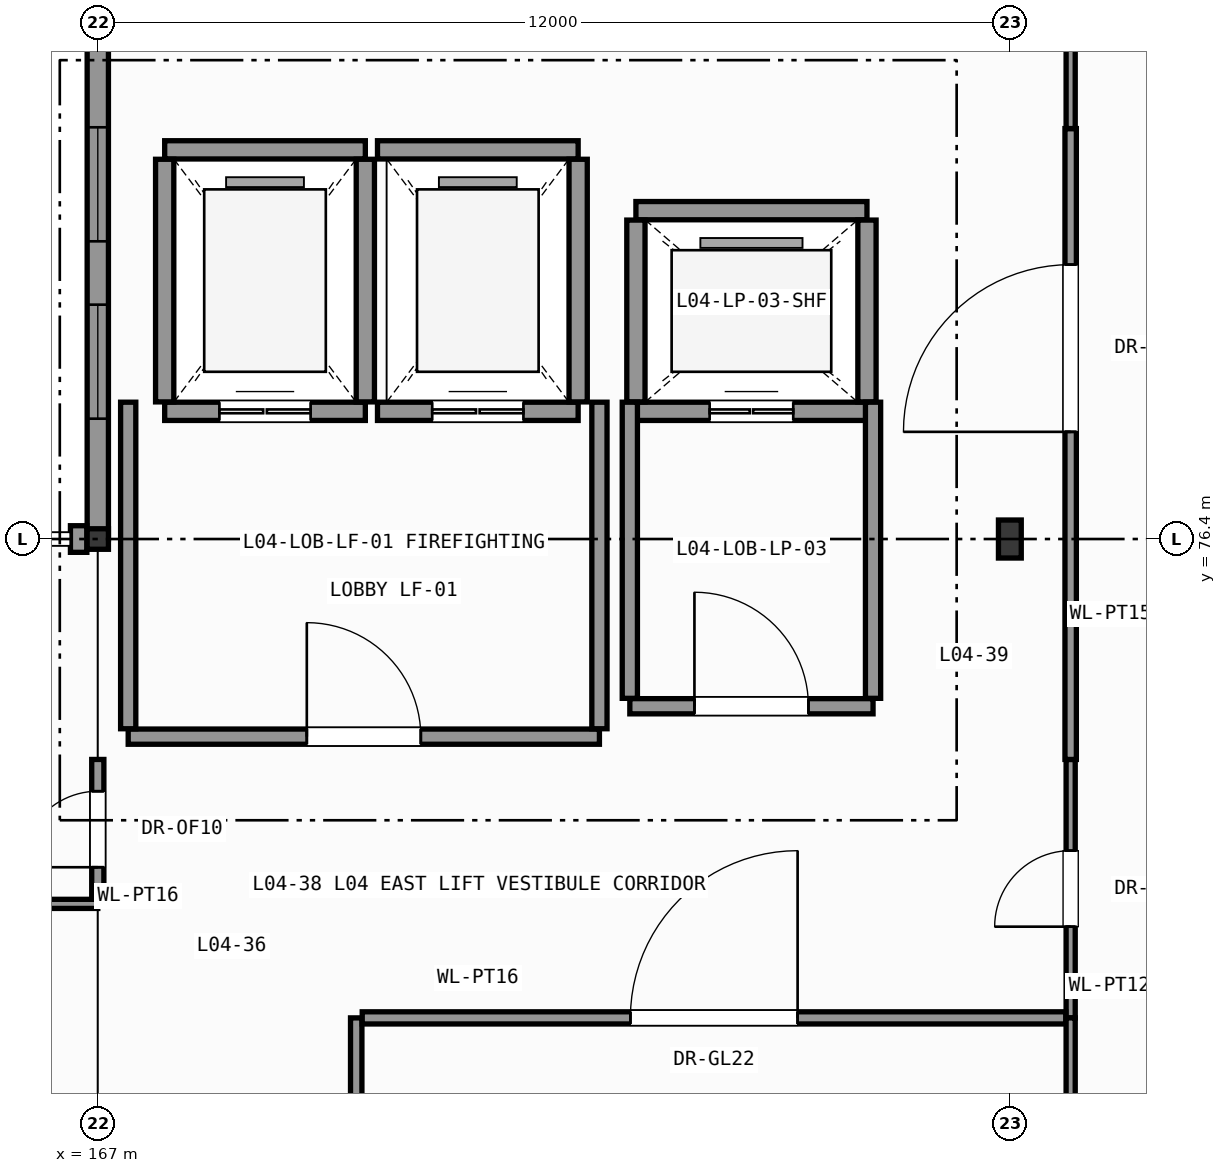
"""IFC4 building model, lengths in metres.
Left out: names, types, materials, properties, quantities, classifications, styles, units other than length and angle.
Written with IfcOpenShell. Run it as: python <this file> out.ifc"""

import sys

from ifc_helpers import new_model, si_unit, direction, frame, frame_2d, origin, origin_2d, place, context, subcontext, project, spatial, rectangle, i_section, extrude, element, fill, save


model = new_model("IFC4")
c1 = context("Model", 3, precision=1e-05, world=origin(), true_north=direction((0.0, 1.0)))
c2 = subcontext(c1, "Body", "Model", "MODEL_VIEW")
j1 = project(units=[si_unit("LENGTHUNIT", "METRE"), si_unit("PLANEANGLEUNIT", "RADIAN")], contexts=[c1])
p1 = place(None, origin())
s1 = spatial("IfcSite", under=j1, at=p1, CompositionType="ELEMENT")
p2 = place(p1, origin())
s2 = spatial("IfcBuilding", under=s1, at=p2, CompositionType="ELEMENT")
p3 = place(p2, frame((0.0, 0.0, 18.0)))
s3 = spatial("IfcBuildingStorey", under=s2, at=p3, CompositionType="ELEMENT", Elevation=18.0)
p4 = place(p3, frame((167.0, 76.4, 0.0), z_axis=(0.0, 0.0, 1.0), x_axis=(1.0, 0.0, 0.0)))
e1 = element("IfcColumn", 1, at=p4, inside=s3, PredefinedType="COLUMN", context=c2, shape_type="SweptSolid", body=[
    extrude(i_section(OverallWidth=0.28, OverallDepth=0.27, WebThickness=0.008, FlangeThickness=0.013, FilletRadius=0.024, at=origin_2d()), origin(), (0.0, 0.0, 1.0), 4.2),
])
p5 = place(p3, frame((179.0, 76.4, 0.0), z_axis=(0.0, 0.0, 1.0), x_axis=(1.0, 0.0, 0.0)))
e2 = element("IfcColumn", 2, at=p5, inside=s3, PredefinedType="COLUMN", context=c2, shape_type="SweptSolid", body=[
    extrude(i_section(OverallWidth=0.3, OverallDepth=0.5, WebThickness=0.014, FlangeThickness=0.028, FilletRadius=0.027, at=origin_2d()), origin(), (0.0, 0.0, 1.0), 4.2),
])
p6 = place(p3, frame((167.0, 76.4, 0.0), z_axis=(0.0, 0.0, 1.0), x_axis=(0.0, 1.0, 0.0)))
e3 = element("IfcWall", 3, at=p6, inside=s3, PredefinedType="SOLIDWALL", context=c2, shape_type="SweptSolid", body=[
    extrude(rectangle(XDim=7.0, YDim=0.28, at=frame_2d((3.5, 0.0))), origin(), (0.0, 0.0, 1.0), 3.645),
])
p7 = place(p6, frame((1.583, 0.0, 0.95)))
e4 = element("IfcOpeningElement", 4, at=p7, cuts=e3, PredefinedType="OPENING", context=c2, shape_type="SweptSolid", body=[
    extrude(rectangle(XDim=1.5, YDim=2.29, at=frame_2d((0.75, 1.145))), frame((0.0, 0.15, 0.0), z_axis=(0.0, -1.0, 0.0), x_axis=(1.0, 0.0, 0.0)), (0.0, 0.0, 1.0), 0.3),
])
p8 = place(p6, frame((3.917, 0.0, 0.95)))
e5 = element("IfcOpeningElement", 5, at=p8, cuts=e3, PredefinedType="OPENING", context=c2, shape_type="SweptSolid", body=[
    extrude(rectangle(XDim=1.5, YDim=2.29, at=frame_2d((0.75, 1.145))), frame((0.0, 0.15, 0.0), z_axis=(0.0, -1.0, 0.0), x_axis=(1.0, 0.0, 0.0)), (0.0, 0.0, 1.0), 0.3),
])
p9 = place(p3, frame((166.856, 76.4, 0.0), z_axis=(0.0, 0.0, 1.0), x_axis=(-1.0, 0.0, 0.0)))
e6 = element("IfcWall", 6, at=p9, inside=s3, PredefinedType="SOLIDWALL", context=c2, shape_type="SweptSolid", body=[
    extrude(rectangle(XDim=0.216, YDim=0.35, at=frame_2d((0.108, 0.0))), origin(), (0.0, 0.0, 1.0), 3.98),
])
p10 = place(p3, frame((167.88, 78.08, 0.0), z_axis=(0.0, 0.0, 1.0), x_axis=(1.0, 0.0, 0.0)))
e7 = element("IfcWall", 7, at=p10, inside=s3, PredefinedType="SHEAR", context=c2, shape_type="SweptSolid", body=[
    extrude(rectangle(XDim=2.64, YDim=0.24, at=frame_2d((1.32, 0.0))), origin(), (0.0, 0.0, 1.0), 3.98),
])
p11 = place(p10, frame((0.72, 0.0, 0.0)))
e8 = element("IfcOpeningElement", 8, at=p11, cuts=e7, PredefinedType="OPENING", context=c2, shape_type="SweptSolid", body=[
    extrude(rectangle(XDim=1.2, YDim=2.2, at=frame_2d((0.6, 1.1))), frame((0.0, 0.13, 0.0), z_axis=(0.0, -1.0, 0.0), x_axis=(1.0, 0.0, 0.0)), (0.0, 0.0, 1.0), 0.26),
])
p12 = place(p3, frame((167.88, 81.52, 0.0), z_axis=(0.0, 0.0, 1.0), x_axis=(1.0, 0.0, 0.0)))
e9 = element("IfcWall", 9, at=p12, inside=s3, PredefinedType="SHEAR", context=c2, shape_type="SweptSolid", body=[
    extrude(rectangle(XDim=2.64, YDim=0.24, at=frame_2d((1.32, 0.0))), origin(), (0.0, 0.0, 1.0), 3.98),
])
for number, where, z_axis, x_axis in (
    (10, (167.88, 78.204, 0.0), (0.0, 0.0, 1.0), (0.0, 1.0, 0.0)),
    (11, (170.52, 78.204, 0.0), (0.0, 0.0, 1.0), (0.0, 1.0, 0.0)),
):
    element("IfcWall", number, at=place(p3, frame(where, z_axis=z_axis, x_axis=x_axis)), inside=s3, PredefinedType="SHEAR", context=c2, shape_type="SweptSolid", body=[
        extrude(rectangle(XDim=3.192, YDim=0.24, at=frame_2d((1.596, 0.0))), origin(), (0.0, 0.0, 1.0), 3.98),
    ])
p13 = place(p3, frame((170.68, 78.08, 0.0), z_axis=(0.0, 0.0, 1.0), x_axis=(1.0, 0.0, 0.0)))
e12 = element("IfcWall", 12, at=p13, inside=s3, PredefinedType="SHEAR", context=c2, shape_type="SweptSolid", body=[
    extrude(rectangle(XDim=2.64, YDim=0.24, at=frame_2d((1.32, 0.0))), origin(), (0.0, 0.0, 1.0), 3.98),
])
p14 = place(p13, frame((0.72, 0.0, 0.0)))
e13 = element("IfcOpeningElement", 13, at=p14, cuts=e12, PredefinedType="OPENING", context=c2, shape_type="SweptSolid", body=[
    extrude(rectangle(XDim=1.2, YDim=2.2, at=frame_2d((0.6, 1.1))), frame((0.0, 0.13, 0.0), z_axis=(0.0, -1.0, 0.0), x_axis=(1.0, 0.0, 0.0)), (0.0, 0.0, 1.0), 0.26),
])
p15 = place(p3, frame((170.68, 81.52, 0.0), z_axis=(0.0, 0.0, 1.0), x_axis=(1.0, 0.0, 0.0)))
e14 = element("IfcWall", 14, at=p15, inside=s3, PredefinedType="SHEAR", context=c2, shape_type="SweptSolid", body=[
    extrude(rectangle(XDim=2.64, YDim=0.24, at=frame_2d((1.32, 0.0))), origin(), (0.0, 0.0, 1.0), 3.98),
])
p16 = place(p3, frame((173.32, 78.204, 0.0), z_axis=(0.0, 0.0, 1.0), x_axis=(0.0, 1.0, 0.0)))
e15 = element("IfcWall", 15, at=p16, inside=s3, PredefinedType="SHEAR", context=c2, shape_type="SweptSolid", body=[
    extrude(rectangle(XDim=3.192, YDim=0.24, at=frame_2d((1.596, 0.0))), origin(), (0.0, 0.0, 1.0), 3.98),
])
p17 = place(p3, frame((174.08, 78.08, 0.0), z_axis=(0.0, 0.0, 1.0), x_axis=(1.0, 0.0, 0.0)))
e16 = element("IfcWall", 16, at=p17, inside=s3, PredefinedType="SHEAR", context=c2, shape_type="SweptSolid", body=[
    extrude(rectangle(XDim=3.04, YDim=0.24, at=frame_2d((1.52, 0.0))), origin(), (0.0, 0.0, 1.0), 3.98),
])
p18 = place(p17, frame((0.97, 0.0, 0.0)))
e17 = element("IfcOpeningElement", 17, at=p18, cuts=e16, PredefinedType="OPENING", context=c2, shape_type="SweptSolid", body=[
    extrude(rectangle(XDim=1.1, YDim=2.2, at=frame_2d((0.55, 1.1))), frame((0.0, 0.13, 0.0), z_axis=(0.0, -1.0, 0.0), x_axis=(1.0, 0.0, 0.0)), (0.0, 0.0, 1.0), 0.26),
])
p19 = place(p3, frame((174.08, 80.72, 0.0), z_axis=(0.0, 0.0, 1.0), x_axis=(1.0, 0.0, 0.0)))
e18 = element("IfcWall", 18, at=p19, inside=s3, PredefinedType="SHEAR", context=c2, shape_type="SweptSolid", body=[
    extrude(rectangle(XDim=3.04, YDim=0.24, at=frame_2d((1.52, 0.0))), origin(), (0.0, 0.0, 1.0), 3.98),
])
for number, where, z_axis, x_axis in (
    (19, (174.08, 78.204, 0.0), (0.0, 0.0, 1.0), (0.0, 1.0, 0.0)),
    (20, (177.12, 78.204, 0.0), (0.0, 0.0, 1.0), (0.0, 1.0, 0.0)),
):
    element("IfcWall", number, at=place(p3, frame(where, z_axis=z_axis, x_axis=x_axis)), inside=s3, PredefinedType="SHEAR", context=c2, shape_type="SweptSolid", body=[
        extrude(rectangle(XDim=2.392, YDim=0.24, at=frame_2d((1.196, 0.0))), origin(), (0.0, 0.0, 1.0), 3.98),
    ])
p20 = place(p3, frame((167.4, 73.8, 0.0), z_axis=(0.0, 0.0, 1.0), x_axis=(1.0, 0.0, 0.0)))
e21 = element("IfcWall", 21, at=p20, inside=s3, PredefinedType="PARTITIONING", context=c2, shape_type="SweptSolid", body=[
    extrude(rectangle(XDim=6.2, YDim=0.2, at=frame_2d((3.1, 0.0))), origin(), (0.0, 0.0, 1.0), 3.575),
])
p21 = place(p20, frame((2.35, 0.0, 0.0)))
e22 = element("IfcOpeningElement", 22, at=p21, cuts=e21, PredefinedType="OPENING", context=c2, shape_type="SweptSolid", body=[
    extrude(rectangle(XDim=1.5, YDim=2.2, at=frame_2d((0.75, 1.1))), frame((0.0, 0.11, 0.0), z_axis=(0.0, -1.0, 0.0), x_axis=(1.0, 0.0, 0.0)), (0.0, 0.0, 1.0), 0.22),
])
for number, where, z_axis, x_axis in (
    (23, (167.4, 73.904, 0.0), (0.0, 0.0, 1.0), (0.0, 1.0, 0.0)),
    (24, (173.6, 73.904, 0.0), (0.0, 0.0, 1.0), (0.0, 1.0, 0.0)),
):
    element("IfcWall", number, at=place(p3, frame(where, z_axis=z_axis, x_axis=x_axis)), inside=s3, PredefinedType="PARTITIONING", context=c2, shape_type="SweptSolid", body=[
        extrude(rectangle(XDim=4.296, YDim=0.2, at=frame_2d((2.148, 0.0))), origin(), (0.0, 0.0, 1.0), 3.98),
    ])
p22 = place(p3, frame((174.0, 74.2, 0.0), z_axis=(0.0, 0.0, 1.0), x_axis=(1.0, 0.0, 0.0)))
e25 = element("IfcWall", 25, at=p22, inside=s3, PredefinedType="PARTITIONING", context=c2, shape_type="SweptSolid", body=[
    extrude(rectangle(XDim=3.2, YDim=0.2, at=frame_2d((1.6, 0.0))), origin(), (0.0, 0.0, 1.0), 3.98),
])
p23 = place(p22, frame((0.85, 0.0, 0.0)))
e26 = element("IfcOpeningElement", 26, at=p23, cuts=e25, PredefinedType="OPENING", context=c2, shape_type="SweptSolid", body=[
    extrude(rectangle(XDim=1.5, YDim=2.2, at=frame_2d((0.75, 1.1))), frame((0.0, 0.11, 0.0), z_axis=(0.0, -1.0, 0.0), x_axis=(1.0, 0.0, 0.0)), (0.0, 0.0, 1.0), 0.22),
])
for number, where, z_axis, x_axis in (
    (27, (174.0, 74.304, 0.0), (0.0, 0.0, 1.0), (0.0, 1.0, 0.0)),
    (28, (177.2, 74.304, 0.0), (0.0, 0.0, 1.0), (0.0, 1.0, 0.0)),
):
    element("IfcWall", number, at=place(p3, frame(where, z_axis=z_axis, x_axis=x_axis)), inside=s3, PredefinedType="PARTITIONING", context=c2, shape_type="SweptSolid", body=[
        extrude(rectangle(XDim=3.896, YDim=0.2, at=frame_2d((1.948, 0.0))), origin(), (0.0, 0.0, 1.0), 3.98),
    ])
p24 = place(p3, frame((126.0, 71.6, 0.0), z_axis=(0.0, 0.0, 1.0), x_axis=(1.0, 0.0, 0.0)))
e29 = element("IfcWall", 29, at=p24, inside=s3, PredefinedType="PARTITIONING", context=c2, shape_type="SweptSolid", body=[
    extrude(rectangle(XDim=41.0, YDim=0.12, at=frame_2d((20.5, 0.0))), origin(), (0.0, 0.0, 1.0), 3.98),
])
p25 = place(p24, frame((19.4, 0.0, 0.0)))
e30 = element("IfcOpeningElement", 30, at=p25, cuts=e29, PredefinedType="OPENING", context=c2, shape_type="SweptSolid", body=[
    extrude(rectangle(XDim=2.2, YDim=2.6, at=frame_2d((1.1, 1.3))), frame((0.0, 0.07, 0.0), z_axis=(0.0, -1.0, 0.0), x_axis=(1.0, 0.0, 0.0)), (0.0, 0.0, 1.0), 0.14),
])
p26 = place(p3, frame((167.0, 71.664, 0.0), z_axis=(0.0, 0.0, 1.0), x_axis=(0.0, 1.0, 0.0)))
e31 = element("IfcWall", 31, at=p26, inside=s3, PredefinedType="PARTITIONING", context=c2, shape_type="SweptSolid", body=[
    extrude(rectangle(XDim=1.836, YDim=0.16, at=frame_2d((0.918, 0.0))), origin(), (0.0, 0.0, 1.0), 3.495),
])
p27 = place(p26, frame((0.418, 0.0, 0.0)))
e32 = element("IfcOpeningElement", 32, at=p27, cuts=e31, PredefinedType="OPENING", context=c2, shape_type="SweptSolid", body=[
    extrude(rectangle(XDim=1.0, YDim=2.15, at=frame_2d((0.5, 1.075))), frame((0.0, 0.09, 0.0), z_axis=(0.0, -1.0, 0.0), x_axis=(1.0, 0.0, 0.0)), (0.0, 0.0, 1.0), 0.18),
])
p28 = place(p3, frame((170.4, 57.4, 0.0), z_axis=(0.0, 0.0, 1.0), x_axis=(0.0, 1.0, 0.0)))
e33 = element("IfcWall", 33, at=p28, inside=s3, PredefinedType="PARTITIONING", context=c2, shape_type="SweptSolid", body=[
    extrude(rectangle(XDim=12.7, YDim=0.15, at=frame_2d((6.35, 0.0))), origin(), (0.0, 0.0, 1.0), 3.98),
])
p29 = place(p28, frame((5.25, 0.0, 0.0)))
e34 = element("IfcOpeningElement", 34, at=p29, cuts=e33, PredefinedType="OPENING", context=c2, shape_type="SweptSolid", body=[
    extrude(rectangle(XDim=2.2, YDim=2.6, at=frame_2d((1.1, 1.3))), frame((0.0, 0.085, 0.0), z_axis=(0.0, -1.0, 0.0), x_axis=(1.0, 0.0, 0.0)), (0.0, 0.0, 1.0), 0.17),
])
p30 = place(p3, frame((179.8, 70.1, 0.0), z_axis=(0.0, 0.0, 1.0), x_axis=(0.0, 1.0, 0.0)))
e35 = element("IfcWall", 35, at=p30, inside=s3, PredefinedType="PARTITIONING", context=c2, shape_type="SweptSolid", body=[
    extrude(rectangle(XDim=3.4, YDim=0.12, at=frame_2d((1.7, 0.0))), origin(), (0.0, 0.0, 1.0), 3.98),
])
p31 = place(p30, frame((1.2, 0.0, 0.0)))
e36 = element("IfcOpeningElement", 36, at=p31, cuts=e35, PredefinedType="OPENING", context=c2, shape_type="SweptSolid", body=[
    extrude(rectangle(XDim=1.0, YDim=2.15, at=frame_2d((0.5, 1.075))), frame((0.0, 0.07, 0.0), z_axis=(0.0, -1.0, 0.0), x_axis=(1.0, 0.0, 0.0)), (0.0, 0.0, 1.0), 0.14),
])
p32 = place(p3, frame((170.479, 70.1, 0.0), z_axis=(0.0, 0.0, 1.0), x_axis=(1.0, 0.0, 0.0)))
e37 = element("IfcWall", 37, at=p32, inside=s3, PredefinedType="PARTITIONING", context=c2, shape_type="SweptSolid", body=[
    extrude(rectangle(XDim=9.257, YDim=0.16, at=frame_2d((4.628, 0.0))), origin(), (0.0, 0.0, 1.0), 3.98),
])
p33 = place(p32, frame((3.529, 0.0, 0.0)))
e38 = element("IfcOpeningElement", 38, at=p33, cuts=e37, PredefinedType="OPENING", context=c2, shape_type="SweptSolid", body=[
    extrude(rectangle(XDim=2.2, YDim=2.6, at=frame_2d((1.1, 1.3))), frame((0.0, 0.09, 0.0), z_axis=(0.0, -1.0, 0.0), x_axis=(1.0, 0.0, 0.0)), (0.0, 0.0, 1.0), 0.18),
])
p34 = place(p3, frame((179.8, 73.5, 0.0), z_axis=(0.0, 0.0, 1.0), x_axis=(0.0, 1.0, 0.0)))
e39 = element("IfcWall", 39, at=p34, inside=s3, PredefinedType="PARTITIONING", context=c2, shape_type="SweptSolid", body=[
    extrude(rectangle(XDim=8.3, YDim=0.15, at=frame_2d((4.15, 0.0))), origin(), (0.0, 0.0, 1.0), 3.98),
])
p35 = place(p34, frame((4.31, 0.0, 0.0)))
e40 = element("IfcOpeningElement", 40, at=p35, cuts=e39, PredefinedType="OPENING", context=c2, shape_type="SweptSolid", body=[
    extrude(rectangle(XDim=2.2, YDim=2.6, at=frame_2d((1.1, 1.3))), frame((0.0, 0.085, 0.0), z_axis=(0.0, -1.0, 0.0), x_axis=(1.0, 0.0, 0.0)), (0.0, 0.0, 1.0), 0.17),
])
p36 = place(p3, frame((179.8, 81.8, 0.0), z_axis=(0.0, 0.0, 1.0), x_axis=(0.0, 1.0, 0.0)))
e41 = element("IfcWall", 41, at=p36, inside=s3, PredefinedType="PARTITIONING", context=c2, shape_type="SweptSolid", body=[
    extrude(rectangle(XDim=1.6, YDim=0.12, at=frame_2d((0.8, 0.0))), origin(), (0.0, 0.0, 1.0), 3.98),
])
p37 = place(p3, frame((179.8, 57.4, 0.0), z_axis=(0.0, 0.0, 1.0), x_axis=(0.0, 1.0, 0.0)))
e42 = element("IfcWall", 42, at=p37, inside=s3, PredefinedType="PARTITIONING", context=c2, shape_type="SweptSolid", body=[
    extrude(rectangle(XDim=12.7, YDim=0.12, at=frame_2d((6.35, 0.0))), origin(), (0.0, 0.0, 1.0), 3.98),
])
p38 = place(p37, frame((5.25, 0.0, 0.0)))
e43 = element("IfcOpeningElement", 43, at=p38, cuts=e42, PredefinedType="OPENING", context=c2, shape_type="SweptSolid", body=[
    extrude(rectangle(XDim=2.2, YDim=2.6, at=frame_2d((1.1, 1.3))), frame((0.0, 0.07, 0.0), z_axis=(0.0, -1.0, 0.0), x_axis=(1.0, 0.0, 0.0)), (0.0, 0.0, 1.0), 0.14),
])
p39 = place(p7, origin())
e44 = element("IfcWindow", 44, at=p39, inside=s3, PartitioningType="SINGLE_PANEL", PredefinedType="WINDOW", context=c2, shape_type="SweptSolid", body=[
    extrude(rectangle(XDim=1.5, YDim=2.29, at=frame_2d((0.75, 1.145))), frame((0.0, 0.03, 0.0), z_axis=(0.0, -1.0, 0.0), x_axis=(1.0, 0.0, 0.0)), (0.0, 0.0, 1.0), 0.06),
])
fill(e4, e44)
p40 = place(p8, origin())
e45 = element("IfcWindow", 45, at=p40, inside=s3, PartitioningType="SINGLE_PANEL", PredefinedType="WINDOW", context=c2, shape_type="SweptSolid", body=[
    extrude(rectangle(XDim=1.5, YDim=2.29, at=frame_2d((0.75, 1.145))), frame((0.0, 0.03, 0.0), z_axis=(0.0, -1.0, 0.0), x_axis=(1.0, 0.0, 0.0)), (0.0, 0.0, 1.0), 0.06),
])
fill(e5, e45)
p41 = place(p11, origin())
e46 = element("IfcDoor", 46, at=p41, inside=s3, OperationType="DOUBLE_DOOR_SLIDING", PredefinedType="DOOR", context=c2, shape_type="SweptSolid", body=[
    extrude(rectangle(XDim=1.2, YDim=2.2, at=frame_2d((0.6, 1.1))), frame((0.0, 0.025, 0.0), z_axis=(0.0, -1.0, 0.0), x_axis=(1.0, 0.0, 0.0)), (0.0, 0.0, 1.0), 0.05),
])
fill(e8, e46)
p42 = place(p14, origin())
e47 = element("IfcDoor", 47, at=p42, inside=s3, OperationType="DOUBLE_DOOR_SLIDING", PredefinedType="DOOR", context=c2, shape_type="SweptSolid", body=[
    extrude(rectangle(XDim=1.2, YDim=2.2, at=frame_2d((0.6, 1.1))), frame((0.0, 0.025, 0.0), z_axis=(0.0, -1.0, 0.0), x_axis=(1.0, 0.0, 0.0)), (0.0, 0.0, 1.0), 0.05),
])
fill(e13, e47)
p43 = place(p18, origin())
e48 = element("IfcDoor", 48, at=p43, inside=s3, OperationType="DOUBLE_DOOR_SLIDING", PredefinedType="DOOR", context=c2, shape_type="SweptSolid", body=[
    extrude(rectangle(XDim=1.1, YDim=2.2, at=frame_2d((0.55, 1.1))), frame((0.0, 0.025, 0.0), z_axis=(0.0, -1.0, 0.0), x_axis=(1.0, 0.0, 0.0)), (0.0, 0.0, 1.0), 0.05),
])
fill(e17, e48)
p44 = place(p21, origin())
e49 = element("IfcDoor", 49, at=p44, inside=s3, OperationType="SINGLE_SWING_LEFT", PredefinedType="DOOR", context=c2, shape_type="SweptSolid", body=[
    extrude(rectangle(XDim=1.5, YDim=2.2, at=frame_2d((0.75, 1.1))), frame((0.0, 0.025, 0.0), z_axis=(0.0, -1.0, 0.0), x_axis=(1.0, 0.0, 0.0)), (0.0, 0.0, 1.0), 0.05),
])
fill(e22, e49)
p45 = place(p23, origin())
e50 = element("IfcDoor", 50, at=p45, inside=s3, OperationType="SINGLE_SWING_LEFT", PredefinedType="DOOR", context=c2, shape_type="SweptSolid", body=[
    extrude(rectangle(XDim=1.5, YDim=2.2, at=frame_2d((0.75, 1.1))), frame((0.0, 0.025, 0.0), z_axis=(0.0, -1.0, 0.0), x_axis=(1.0, 0.0, 0.0)), (0.0, 0.0, 1.0), 0.05),
])
fill(e26, e50)
p46 = place(p27, origin())
e51 = element("IfcDoor", 51, at=p46, inside=s3, OperationType="SINGLE_SWING_LEFT", PredefinedType="DOOR", context=c2, shape_type="SweptSolid", body=[
    extrude(rectangle(XDim=1.0, YDim=2.15, at=frame_2d((0.5, 1.075))), frame((0.0, 0.025, 0.0), z_axis=(0.0, -1.0, 0.0), x_axis=(1.0, 0.0, 0.0)), (0.0, 0.0, 1.0), 0.05),
])
fill(e32, e51)
p47 = place(p31, origin())
e52 = element("IfcDoor", 52, at=p47, inside=s3, OperationType="SINGLE_SWING_LEFT", PredefinedType="DOOR", context=c2, shape_type="SweptSolid", body=[
    extrude(rectangle(XDim=1.0, YDim=2.15, at=frame_2d((0.5, 1.075))), frame((0.0, 0.025, 0.0), z_axis=(0.0, -1.0, 0.0), x_axis=(1.0, 0.0, 0.0)), (0.0, 0.0, 1.0), 0.05),
])
fill(e36, e52)
p48 = place(p33, origin())
e53 = element("IfcDoor", 53, at=p48, inside=s3, OperationType="SINGLE_SWING_RIGHT", PredefinedType="DOOR", context=c2, shape_type="SweptSolid", body=[
    extrude(rectangle(XDim=2.2, YDim=2.6, at=frame_2d((1.1, 1.3))), frame((0.0, 0.025, 0.0), z_axis=(0.0, -1.0, 0.0), x_axis=(1.0, 0.0, 0.0)), (0.0, 0.0, 1.0), 0.05),
])
fill(e38, e53)
p49 = place(p35, origin())
e54 = element("IfcDoor", 54, at=p49, inside=s3, OperationType="SINGLE_SWING_LEFT", PredefinedType="DOOR", context=c2, shape_type="SweptSolid", body=[
    extrude(rectangle(XDim=2.2, YDim=2.6, at=frame_2d((1.1, 1.3))), frame((0.0, 0.025, 0.0), z_axis=(0.0, -1.0, 0.0), x_axis=(1.0, 0.0, 0.0)), (0.0, 0.0, 1.0), 0.05),
])
fill(e40, e54)
save(model, sys.argv[1])
